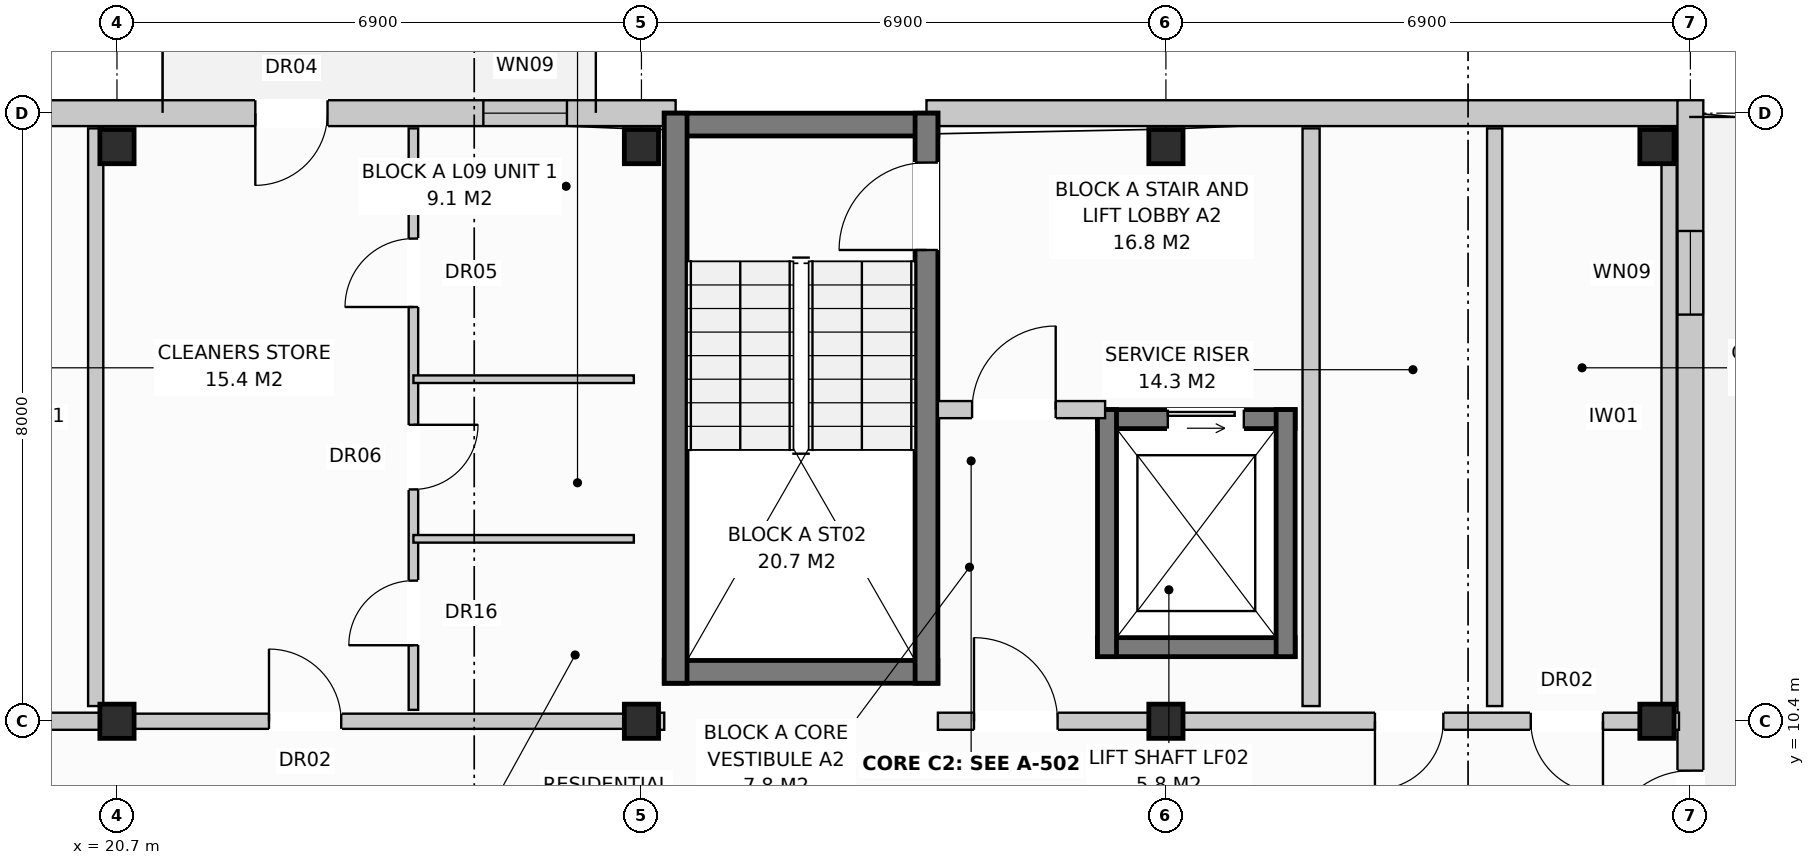
"""IFC4 building model, lengths in metres.
Left out: names, types, materials, properties, quantities, classifications, styles, units other than length and angle.
Written with IfcOpenShell. Run it as: python <this file> out.ifc"""

import sys

from ifc_helpers import new_model, si_unit, direction, frame, frame_2d, origin, origin_with_axes, origin_2d, place, context, subcontext, project, spatial, rectangle, extrude, element, fill, save


model = new_model("IFC4")
c1 = context("Model", 3, precision=1e-05, world=origin(), true_north=direction((0.0, 1.0)))
c2 = subcontext(c1, "Body", "Model", "MODEL_VIEW")
j1 = project(units=[si_unit("LENGTHUNIT", "METRE"), si_unit("PLANEANGLEUNIT", "RADIAN")], contexts=[c1])
p1 = place(None, origin())
s1 = spatial("IfcSite", under=j1, at=p1, CompositionType="ELEMENT")
p2 = place(p1, origin())
s2 = spatial("IfcBuilding", under=s1, at=p2, CompositionType="ELEMENT")
p3 = place(p2, frame((0.0, 0.0, 30.4)))
s3 = spatial("IfcBuildingStorey", under=s2, at=p3, CompositionType="ELEMENT", Elevation=30.4)
for number, where, z_axis, x_axis in (
    (1, (20.7, 10.4, 0.0), (0.0, 0.0, 1.0), (1.0, 0.0, 0.0)),
    (2, (20.7, 17.96, 0.0), (0.0, 0.0, 1.0), (1.0, 0.0, 0.0)),
    (3, (27.6, 10.4, 0.0), (0.0, 0.0, 1.0), (1.0, 0.0, 0.0)),
    (4, (27.6, 17.96, 0.0), (0.0, 0.0, 1.0), (1.0, 0.0, 0.0)),
    (5, (34.5, 10.4, 0.0), (0.0, 0.0, 1.0), (1.0, 0.0, 0.0)),
    (6, (34.5, 17.96, 0.0), (0.0, 0.0, 1.0), (1.0, 0.0, 0.0)),
    (7, (40.96, 10.4, 0.0), (0.0, 0.0, 1.0), (1.0, 0.0, 0.0)),
    (8, (40.96, 17.96, 0.0), (0.0, 0.0, 1.0), (1.0, 0.0, 0.0)),
):
    element("IfcColumn", number, at=place(p3, frame(where, z_axis=z_axis, x_axis=x_axis)), inside=s3, PredefinedType="COLUMN", context=c2, shape_type="SweptSolid", body=[
        extrude(rectangle(XDim=0.45, YDim=0.45, at=origin_2d()), origin(), (0.0, 0.0, 1.0), 3.2),
    ])
p4 = place(p3, frame((10.65, 18.4, 0.0), z_axis=(0.0, 0.0, 1.0), x_axis=(1.0, 0.0, 0.0)))
e9 = element("IfcWall", 9, at=p4, inside=s3, PredefinedType="STANDARD", context=c2, shape_type="SweptSolid", body=[
    extrude(rectangle(XDim=17.4, YDim=0.34, at=frame_2d((8.7, 0.0))), origin(), (0.0, 0.0, 1.0), 2.96),
])
p5 = place(p4, frame((11.87, 0.0, 0.0)))
e10 = element("IfcOpeningElement", 10, at=p5, cuts=e9, PredefinedType="OPENING", context=c2, shape_type="SweptSolid", body=[
    extrude(rectangle(XDim=0.95, YDim=2.1, at=frame_2d((0.475, 1.05))), frame((0.0, 0.182, 0.0), z_axis=(0.0, -1.0, 0.0), x_axis=(1.0, 0.0, 0.0)), (0.0, 0.0, 1.0), 0.364),
])
p6 = place(p4, frame((14.87, 0.0, 0.72)))
e11 = element("IfcOpeningElement", 11, at=p6, cuts=e9, PredefinedType="OPENING", context=c2, shape_type="SweptSolid", body=[
    extrude(rectangle(XDim=1.1, YDim=1.5, at=frame_2d((0.55, 0.75))), frame((0.0, 0.182, 0.0), z_axis=(0.0, -1.0, 0.0), x_axis=(1.0, 0.0, 0.0)), (0.0, 0.0, 1.0), 0.364),
])
p7 = place(p3, frame((31.35, 18.4, 0.0), z_axis=(0.0, 0.0, 1.0), x_axis=(1.0, 0.0, 0.0)))
e12 = element("IfcWall", 12, at=p7, inside=s3, PredefinedType="STANDARD", context=c2, shape_type="SweptSolid", body=[
    extrude(rectangle(XDim=9.89, YDim=0.34, at=frame_2d((4.945, 0.0))), origin(), (0.0, 0.0, 1.0), 2.96),
])
p8 = place(p3, frame((41.4, -0.17, 0.0), z_axis=(0.0, 0.0, 1.0), x_axis=(0.0, 1.0, 0.0)))
e13 = element("IfcWall", 13, at=p8, inside=s3, PredefinedType="STANDARD", context=c2, shape_type="SweptSolid", body=[
    extrude(rectangle(XDim=18.74, YDim=0.34, at=frame_2d((9.37, 0.0))), origin(), (0.0, 0.0, 1.0), 2.96),
])
p9 = place(p8, frame((8.82, 0.0, 0.0)))
e14 = element("IfcOpeningElement", 14, at=p9, cuts=e13, PredefinedType="OPENING", context=c2, shape_type="SweptSolid", body=[
    extrude(rectangle(XDim=1.1, YDim=2.1, at=frame_2d((0.55, 1.05))), frame((0.0, 0.182, 0.0), z_axis=(0.0, -1.0, 0.0), x_axis=(1.0, 0.0, 0.0)), (0.0, 0.0, 1.0), 0.364),
])
p10 = place(p8, frame((1.82, 0.0, 0.0)))
e15 = element("IfcOpeningElement", 15, at=p10, cuts=e13, PredefinedType="OPENING", context=c2, shape_type="SweptSolid", body=[
    extrude(rectangle(XDim=1.1, YDim=2.1, at=frame_2d((0.55, 1.05))), frame((0.0, 0.182, 0.0), z_axis=(0.0, -1.0, 0.0), x_axis=(1.0, 0.0, 0.0)), (0.0, 0.0, 1.0), 0.364),
])
p11 = place(p8, frame((15.92, 0.0, 0.72)))
e16 = element("IfcOpeningElement", 16, at=p11, cuts=e13, PredefinedType="OPENING", context=c2, shape_type="SweptSolid", body=[
    extrude(rectangle(XDim=1.1, YDim=1.5, at=frame_2d((0.55, 0.75))), frame((0.0, 0.182, 0.0), z_axis=(0.0, -1.0, 0.0), x_axis=(1.0, 0.0, 0.0)), (0.0, 0.0, 1.0), 0.364),
])
p12 = place(p3, frame((20.42, 10.6, 0.0), z_axis=(0.0, 0.0, 1.0), x_axis=(0.0, 1.0, 0.0)))
e17 = element("IfcWall", 17, at=p12, inside=s3, PredefinedType="PARTITIONING", context=c2, shape_type="SweptSolid", body=[
    extrude(rectangle(XDim=7.6, YDim=0.2, at=frame_2d((3.8, 0.0))), origin(), (0.0, 0.0, 1.0), 2.96),
])
p13 = place(p3, frame((10.8, 10.4, 0.0), z_axis=(0.0, 0.0, 1.0), x_axis=(1.0, 0.0, 0.0)))
e18 = element("IfcWall", 18, at=p13, inside=s3, PredefinedType="PARTITIONING", context=c2, shape_type="SweptSolid", body=[
    extrude(rectangle(XDim=9.9, YDim=0.225, at=frame_2d((4.95, 0.0))), origin(), (0.0, 0.0, 1.0), 2.4),
])
p14 = place(p13, frame((0.475, 0.0, 0.0)))
e19 = element("IfcOpeningElement", 19, at=p14, cuts=e18, PredefinedType="OPENING", context=c2, shape_type="SweptSolid", body=[
    extrude(rectangle(XDim=1.1, YDim=2.15, at=frame_2d((0.55, 1.075))), frame((0.0, 0.125, 0.0), z_axis=(0.0, -1.0, 0.0), x_axis=(1.0, 0.0, 0.0)), (0.0, 0.0, 1.0), 0.249),
])
p15 = place(p13, frame((5.75, 0.0, 0.0)))
e20 = element("IfcOpeningElement", 20, at=p15, cuts=e18, PredefinedType="OPENING", context=c2, shape_type="SweptSolid", body=[
    extrude(rectangle(XDim=0.9, YDim=2.1, at=frame_2d((0.45, 1.05))), frame((0.0, 0.125, 0.0), z_axis=(0.0, -1.0, 0.0), x_axis=(1.0, 0.0, 0.0)), (0.0, 0.0, 1.0), 0.249),
])
p16 = place(p13, frame((7.8, 0.0, 0.0)))
e21 = element("IfcOpeningElement", 21, at=p16, cuts=e18, PredefinedType="OPENING", context=c2, shape_type="SweptSolid", body=[
    extrude(rectangle(XDim=0.95, YDim=2.15, at=frame_2d((0.475, 1.075))), frame((0.0, 0.125, 0.0), z_axis=(0.0, -1.0, 0.0), x_axis=(1.0, 0.0, 0.0)), (0.0, 0.0, 1.0), 0.249),
])
for number, where, z_axis, x_axis in (
    (22, (27.9, 18.25, 0.0), (0.0, 0.0, 1.0), (1.0, 0.0, 0.0)),
    (23, (27.9, 11.05, 0.0), (0.0, 0.0, 1.0), (1.0, 0.0, 0.0)),
):
    element("IfcWall", number, at=place(p3, frame(where, z_axis=z_axis, x_axis=x_axis)), inside=s3, PredefinedType="SHEAR", context=c2, shape_type="SweptSolid", body=[
        extrude(rectangle(XDim=3.6, YDim=0.3, at=frame_2d((1.8, 0.0))), origin(), (0.0, 0.0, 1.0), 2.96),
    ])
p17 = place(p3, frame((28.05, 10.9, 0.0), z_axis=(0.0, 0.0, 1.0), x_axis=(0.0, 1.0, 0.0)))
e24 = element("IfcWall", 24, at=p17, inside=s3, PredefinedType="SHEAR", context=c2, shape_type="SweptSolid", body=[
    extrude(rectangle(XDim=7.5, YDim=0.3, at=frame_2d((3.75, 0.0))), origin(), (0.0, 0.0, 1.0), 2.96),
])
p18 = place(p3, frame((31.35, 10.9, 0.0), z_axis=(0.0, 0.0, 1.0), x_axis=(0.0, 1.0, 0.0)))
e25 = element("IfcWall", 25, at=p18, inside=s3, PredefinedType="SHEAR", context=c2, shape_type="SweptSolid", body=[
    extrude(rectangle(XDim=7.5, YDim=0.3, at=frame_2d((3.75, 0.0))), origin(), (0.0, 0.0, 1.0), 2.96),
])
p19 = place(p18, frame((5.7, 0.0, 0.0)))
e26 = element("IfcOpeningElement", 26, at=p19, cuts=e25, PredefinedType="OPENING", context=c2, shape_type="SweptSolid", body=[
    extrude(rectangle(XDim=1.15, YDim=2.15, at=frame_2d((0.575, 1.075))), frame((0.0, 0.162, 0.0), z_axis=(0.0, -1.0, 0.0), x_axis=(1.0, 0.0, 0.0)), (0.0, 0.0, 1.0), 0.324),
])
p20 = place(p3, frame((33.6, 14.375, 0.0), z_axis=(0.0, 0.0, 1.0), x_axis=(1.0, 0.0, 0.0)))
e27 = element("IfcWall", 27, at=p20, inside=s3, PredefinedType="SHEAR", context=c2, shape_type="SweptSolid", body=[
    extrude(rectangle(XDim=2.6, YDim=0.25, at=frame_2d((1.3, 0.0))), origin(), (0.0, 0.0, 1.0), 2.96),
])
p21 = place(p20, frame((0.925, 0.0, 0.0)))
e28 = element("IfcOpeningElement", 28, at=p21, cuts=e27, PredefinedType="OPENING", context=c2, shape_type="SweptSolid", body=[
    extrude(rectangle(XDim=1.0, YDim=2.1, at=frame_2d((0.5, 1.05))), frame((0.0, 0.137, 0.0), z_axis=(0.0, -1.0, 0.0), x_axis=(1.0, 0.0, 0.0)), (0.0, 0.0, 1.0), 0.274),
])
p22 = place(p3, frame((33.6, 11.375, 0.0), z_axis=(0.0, 0.0, 1.0), x_axis=(1.0, 0.0, 0.0)))
e29 = element("IfcWall", 29, at=p22, inside=s3, PredefinedType="SHEAR", context=c2, shape_type="SweptSolid", body=[
    extrude(rectangle(XDim=2.6, YDim=0.25, at=frame_2d((1.3, 0.0))), origin(), (0.0, 0.0, 1.0), 2.96),
])
for number, where, z_axis, x_axis in (
    (30, (33.725, 11.25, 0.0), (0.0, 0.0, 1.0), (0.0, 1.0, 0.0)),
    (31, (36.075, 11.25, 0.0), (0.0, 0.0, 1.0), (0.0, 1.0, 0.0)),
):
    element("IfcWall", number, at=place(p3, frame(where, z_axis=z_axis, x_axis=x_axis)), inside=s3, PredefinedType="SHEAR", context=c2, shape_type="SweptSolid", body=[
        extrude(rectangle(XDim=3.25, YDim=0.25, at=frame_2d((1.625, 0.0))), origin(), (0.0, 0.0, 1.0), 2.96),
    ])
p23 = place(p3, frame((36.41, 10.6, 0.0), z_axis=(0.0, 0.0, 1.0), x_axis=(0.0, 1.0, 0.0)))
e32 = element("IfcWall", 32, at=p23, inside=s3, PredefinedType="PARTITIONING", context=c2, shape_type="SweptSolid", body=[
    extrude(rectangle(XDim=7.6, YDim=0.225, at=frame_2d((3.8, 0.0))), origin(), (0.0, 0.0, 1.0), 2.59),
])
p24 = place(p3, frame((31.5, 14.5, 0.0), z_axis=(0.0, 0.0, 1.0), x_axis=(1.0, 0.0, 0.0)))
e33 = element("IfcWall", 33, at=p24, inside=s3, PredefinedType="PARTITIONING", context=c2, shape_type="SweptSolid", body=[
    extrude(rectangle(XDim=2.2, YDim=0.225, at=frame_2d((1.1, 0.0))), origin(), (0.0, 0.0, 1.0), 2.96),
])
p25 = place(p24, frame((0.45, 0.0, 0.0)))
e34 = element("IfcOpeningElement", 34, at=p25, cuts=e33, PredefinedType="OPENING", context=c2, shape_type="SweptSolid", body=[
    extrude(rectangle(XDim=1.1, YDim=2.15, at=frame_2d((0.55, 1.075))), frame((0.0, 0.125, 0.0), z_axis=(0.0, -1.0, 0.0), x_axis=(1.0, 0.0, 0.0)), (0.0, 0.0, 1.0), 0.249),
])
p26 = place(p3, frame((27.6, 10.4, 0.0), z_axis=(0.0, 0.0, 1.0), x_axis=(1.0, 0.0, 0.0)))
e35 = element("IfcWall", 35, at=p26, inside=s3, PredefinedType="PARTITIONING", context=c2, shape_type="SweptSolid", body=[
    extrude(rectangle(XDim=0.3, YDim=0.225, at=frame_2d((0.15, 0.0))), origin(), (0.0, 0.0, 1.0), 2.96),
])
p27 = place(p3, frame((38.825, 10.6, 0.0), z_axis=(0.0, 0.0, 1.0), x_axis=(0.0, 1.0, 0.0)))
e36 = element("IfcWall", 36, at=p27, inside=s3, PredefinedType="PARTITIONING", context=c2, shape_type="SweptSolid", body=[
    extrude(rectangle(XDim=7.6, YDim=0.2, at=frame_2d((3.8, 0.0))), origin(), (0.0, 0.0, 1.0), 2.96),
])
p28 = place(p3, frame((41.12, 10.6, 0.0), z_axis=(0.0, 0.0, 1.0), x_axis=(0.0, 1.0, 0.0)))
e37 = element("IfcWall", 37, at=p28, inside=s3, PredefinedType="PARTITIONING", context=c2, shape_type="SweptSolid", body=[
    extrude(rectangle(XDim=7.6, YDim=0.2, at=frame_2d((3.8, 0.0))), origin(), (0.0, 0.0, 1.0), 2.4),
])
p29 = place(p3, frame((31.5, 10.4, 0.0), z_axis=(0.0, 0.0, 1.0), x_axis=(1.0, 0.0, 0.0)))
e38 = element("IfcWall", 38, at=p29, inside=s3, PredefinedType="PARTITIONING", context=c2, shape_type="SweptSolid", body=[
    extrude(rectangle(XDim=9.75, YDim=0.225, at=frame_2d((4.875, 0.0))), origin(), (0.0, 0.0, 1.0), 2.4),
])
p30 = place(p29, frame((0.475, 0.0, 0.0)))
e39 = element("IfcOpeningElement", 39, at=p30, cuts=e38, PredefinedType="OPENING", context=c2, shape_type="SweptSolid", body=[
    extrude(rectangle(XDim=1.1, YDim=2.15, at=frame_2d((0.55, 1.075))), frame((0.0, 0.125, 0.0), z_axis=(0.0, -1.0, 0.0), x_axis=(1.0, 0.0, 0.0)), (0.0, 0.0, 1.0), 0.249),
])
p31 = place(p29, frame((5.75, 0.0, 0.0)))
e40 = element("IfcOpeningElement", 40, at=p31, cuts=e38, PredefinedType="OPENING", context=c2, shape_type="SweptSolid", body=[
    extrude(rectangle(XDim=0.9, YDim=2.1, at=frame_2d((0.45, 1.05))), frame((0.0, 0.125, 0.0), z_axis=(0.0, -1.0, 0.0), x_axis=(1.0, 0.0, 0.0)), (0.0, 0.0, 1.0), 0.249),
])
p32 = place(p29, frame((7.8, 0.0, 0.0)))
e41 = element("IfcOpeningElement", 41, at=p32, cuts=e38, PredefinedType="OPENING", context=c2, shape_type="SweptSolid", body=[
    extrude(rectangle(XDim=0.95, YDim=2.15, at=frame_2d((0.475, 1.075))), frame((0.0, 0.125, 0.0), z_axis=(0.0, -1.0, 0.0), x_axis=(1.0, 0.0, 0.0)), (0.0, 0.0, 1.0), 0.249),
])
p33 = place(p3, frame((20.7, 10.4, 0.0), z_axis=(0.0, 0.0, 1.0), x_axis=(1.0, 0.0, 0.0)))
e42 = element("IfcWall", 42, at=p33, inside=s3, PredefinedType="PARTITIONING", context=c2, shape_type="SweptSolid", body=[
    extrude(rectangle(XDim=6.9, YDim=0.2, at=frame_2d((3.45, 0.0))), origin(), (0.0, 0.0, 1.0), 2.4),
])
p34 = place(p33, frame((2.0, 0.0, 0.0)))
e43 = element("IfcOpeningElement", 43, at=p34, cuts=e42, PredefinedType="OPENING", context=c2, shape_type="SweptSolid", body=[
    extrude(rectangle(XDim=0.95, YDim=2.15, at=frame_2d((0.475, 1.075))), frame((0.0, 0.112, 0.0), z_axis=(0.0, -1.0, 0.0), x_axis=(1.0, 0.0, 0.0)), (0.0, 0.0, 1.0), 0.224),
])
p35 = place(p3, frame((24.6, 10.55, 0.0), z_axis=(0.0, 0.0, 1.0), x_axis=(0.0, 1.0, 0.0)))
e44 = element("IfcWall", 44, at=p35, inside=s3, PredefinedType="PARTITIONING", context=c2, shape_type="SweptSolid", body=[
    extrude(rectangle(XDim=7.65, YDim=0.125, at=frame_2d((3.825, 0.0))), origin(), (0.0, 0.0, 1.0), 2.96),
])
p36 = place(p35, frame((0.85, 0.0, 0.0)))
e45 = element("IfcOpeningElement", 45, at=p36, cuts=e44, PredefinedType="OPENING", context=c2, shape_type="SweptSolid", body=[
    extrude(rectangle(XDim=0.85, YDim=2.1, at=frame_2d((0.425, 1.05))), frame((0.0, 0.074, 0.0), z_axis=(0.0, -1.0, 0.0), x_axis=(1.0, 0.0, 0.0)), (0.0, 0.0, 1.0), 0.149),
])
p37 = place(p35, frame((2.9, 0.0, 0.0)))
e46 = element("IfcOpeningElement", 46, at=p37, cuts=e44, PredefinedType="OPENING", context=c2, shape_type="SweptSolid", body=[
    extrude(rectangle(XDim=0.85, YDim=2.05, at=frame_2d((0.425, 1.025))), frame((0.0, 0.074, 0.0), z_axis=(0.0, -1.0, 0.0), x_axis=(1.0, 0.0, 0.0)), (0.0, 0.0, 1.0), 0.149),
])
p38 = place(p35, frame((5.3, 0.0, 0.0)))
e47 = element("IfcOpeningElement", 47, at=p38, cuts=e44, PredefinedType="OPENING", context=c2, shape_type="SweptSolid", body=[
    extrude(rectangle(XDim=0.9, YDim=2.1, at=frame_2d((0.45, 1.05))), frame((0.0, 0.074, 0.0), z_axis=(0.0, -1.0, 0.0), x_axis=(1.0, 0.0, 0.0)), (0.0, 0.0, 1.0), 0.149),
])
for number, where, z_axis, x_axis in (
    (48, (24.6, 12.8, 0.0), (0.0, 0.0, 1.0), (1.0, 0.0, 0.0)),
    (49, (24.6, 14.9, 0.0), (0.0, 0.0, 1.0), (1.0, 0.0, 0.0)),
):
    element("IfcWall", number, at=place(p3, frame(where, z_axis=z_axis, x_axis=x_axis)), inside=s3, PredefinedType="PARTITIONING", context=c2, shape_type="SweptSolid", body=[
        extrude(rectangle(XDim=2.9, YDim=0.1, at=frame_2d((1.45, 0.0))), origin(), (0.0, 0.0, 1.0), 2.96),
    ])
p39 = place(p5, frame((0.95, 0.0, 0.0), z_axis=(0.0, 0.0, 1.0), x_axis=(-1.0, 0.0, 0.0)))
e50 = element("IfcDoor", 50, at=p39, inside=s3, OperationType="SINGLE_SWING_LEFT", PredefinedType="DOOR", context=c2, shape_type="SweptSolid", body=[
    extrude(rectangle(XDim=0.95, YDim=2.1, at=frame_2d((0.475, 1.05))), frame((0.0, 0.025, 0.0), z_axis=(0.0, -1.0, 0.0), x_axis=(1.0, 0.0, 0.0)), (0.0, 0.0, 1.0), 0.05),
])
fill(e10, e50)
p40 = place(p6, origin_with_axes())
e51 = element("IfcWindow", 51, at=p40, inside=s3, PartitioningType="SINGLE_PANEL", PredefinedType="WINDOW", context=c2, shape_type="SweptSolid", body=[
    extrude(rectangle(XDim=1.1, YDim=1.5, at=frame_2d((0.55, 0.75))), frame((0.0, 0.03, 0.0), z_axis=(0.0, -1.0, 0.0), x_axis=(1.0, 0.0, 0.0)), (0.0, 0.0, 1.0), 0.06),
])
fill(e11, e51)
p41 = place(p9, origin_with_axes())
e52 = element("IfcDoor", 52, at=p41, inside=s3, OperationType="SINGLE_SWING_LEFT", PredefinedType="DOOR", context=c2, shape_type="SweptSolid", body=[
    extrude(rectangle(XDim=1.1, YDim=2.1, at=frame_2d((0.55, 1.05))), frame((0.0, 0.025, 0.0), z_axis=(0.0, -1.0, 0.0), x_axis=(1.0, 0.0, 0.0)), (0.0, 0.0, 1.0), 0.05),
])
fill(e14, e52)
p42 = place(p11, origin_with_axes())
e53 = element("IfcWindow", 53, at=p42, inside=s3, PartitioningType="SINGLE_PANEL", PredefinedType="WINDOW", context=c2, shape_type="SweptSolid", body=[
    extrude(rectangle(XDim=1.1, YDim=1.5, at=frame_2d((0.55, 0.75))), frame((0.0, 0.03, 0.0), z_axis=(0.0, -1.0, 0.0), x_axis=(1.0, 0.0, 0.0)), (0.0, 0.0, 1.0), 0.06),
])
fill(e16, e53)
p43 = place(p19, origin_with_axes())
e54 = element("IfcDoor", 54, at=p43, inside=s3, OperationType="SINGLE_SWING_LEFT", PredefinedType="DOOR", context=c2, shape_type="SweptSolid", body=[
    extrude(rectangle(XDim=1.15, YDim=2.15, at=frame_2d((0.575, 1.075))), frame((0.0, 0.025, 0.0), z_axis=(0.0, -1.0, 0.0), x_axis=(1.0, 0.0, 0.0)), (0.0, 0.0, 1.0), 0.05),
])
fill(e26, e54)
p44 = place(p21, origin_with_axes())
e55 = element("IfcDoor", 55, at=p44, inside=s3, OperationType="SLIDING_TO_LEFT", PredefinedType="DOOR", context=c2, shape_type="SweptSolid", body=[
    extrude(rectangle(XDim=1.0, YDim=2.1, at=frame_2d((0.5, 1.05))), frame((0.0, 0.025, 0.0), z_axis=(0.0, -1.0, 0.0), x_axis=(1.0, 0.0, 0.0)), (0.0, 0.0, 1.0), 0.05),
])
fill(e28, e55)
p45 = place(p25, origin_with_axes())
e56 = element("IfcDoor", 56, at=p45, inside=s3, OperationType="SINGLE_SWING_RIGHT", PredefinedType="DOOR", context=c2, shape_type="SweptSolid", body=[
    extrude(rectangle(XDim=1.1, YDim=2.15, at=frame_2d((0.55, 1.075))), frame((0.0, 0.025, 0.0), z_axis=(0.0, -1.0, 0.0), x_axis=(1.0, 0.0, 0.0)), (0.0, 0.0, 1.0), 0.05),
])
fill(e34, e56)
p46 = place(p30, origin_with_axes())
e57 = element("IfcDoor", 57, at=p46, inside=s3, OperationType="SINGLE_SWING_LEFT", PredefinedType="DOOR", context=c2, shape_type="SweptSolid", body=[
    extrude(rectangle(XDim=1.1, YDim=2.15, at=frame_2d((0.55, 1.075))), frame((0.0, 0.025, 0.0), z_axis=(0.0, -1.0, 0.0), x_axis=(1.0, 0.0, 0.0)), (0.0, 0.0, 1.0), 0.05),
])
fill(e39, e57)
p47 = place(p31, frame((0.9, 0.0, 0.0), z_axis=(0.0, 0.0, 1.0), x_axis=(-1.0, 0.0, 0.0)))
e58 = element("IfcDoor", 58, at=p47, inside=s3, OperationType="SINGLE_SWING_LEFT", PredefinedType="DOOR", context=c2, shape_type="SweptSolid", body=[
    extrude(rectangle(XDim=0.9, YDim=2.1, at=frame_2d((0.45, 1.05))), frame((0.0, 0.025, 0.0), z_axis=(0.0, -1.0, 0.0), x_axis=(1.0, 0.0, 0.0)), (0.0, 0.0, 1.0), 0.05),
])
fill(e40, e58)
p48 = place(p32, frame((0.95, 0.0, 0.0), z_axis=(0.0, 0.0, 1.0), x_axis=(-1.0, 0.0, 0.0)))
e59 = element("IfcDoor", 59, at=p48, inside=s3, OperationType="SINGLE_SWING_RIGHT", PredefinedType="DOOR", context=c2, shape_type="SweptSolid", body=[
    extrude(rectangle(XDim=0.95, YDim=2.15, at=frame_2d((0.475, 1.075))), frame((0.0, 0.025, 0.0), z_axis=(0.0, -1.0, 0.0), x_axis=(1.0, 0.0, 0.0)), (0.0, 0.0, 1.0), 0.05),
])
fill(e41, e59)
p49 = place(p34, origin_with_axes())
e60 = element("IfcDoor", 60, at=p49, inside=s3, OperationType="SINGLE_SWING_LEFT", PredefinedType="DOOR", context=c2, shape_type="SweptSolid", body=[
    extrude(rectangle(XDim=0.95, YDim=2.15, at=frame_2d((0.475, 1.075))), frame((0.0, 0.025, 0.0), z_axis=(0.0, -1.0, 0.0), x_axis=(1.0, 0.0, 0.0)), (0.0, 0.0, 1.0), 0.05),
])
fill(e43, e60)
p50 = place(p36, origin_with_axes())
e61 = element("IfcDoor", 61, at=p50, inside=s3, OperationType="SINGLE_SWING_LEFT", PredefinedType="DOOR", context=c2, shape_type="SweptSolid", body=[
    extrude(rectangle(XDim=0.85, YDim=2.1, at=frame_2d((0.425, 1.05))), frame((0.0, 0.025, 0.0), z_axis=(0.0, -1.0, 0.0), x_axis=(1.0, 0.0, 0.0)), (0.0, 0.0, 1.0), 0.05),
])
fill(e45, e61)
p51 = place(p37, frame((0.85, 0.0, 0.0), z_axis=(0.0, 0.0, 1.0), x_axis=(-1.0, 0.0, 0.0)))
e62 = element("IfcDoor", 62, at=p51, inside=s3, OperationType="SINGLE_SWING_RIGHT", PredefinedType="DOOR", context=c2, shape_type="SweptSolid", body=[
    extrude(rectangle(XDim=0.85, YDim=2.05, at=frame_2d((0.425, 1.025))), frame((0.0, 0.025, 0.0), z_axis=(0.0, -1.0, 0.0), x_axis=(1.0, 0.0, 0.0)), (0.0, 0.0, 1.0), 0.05),
])
fill(e46, e62)
p52 = place(p38, origin_with_axes())
e63 = element("IfcDoor", 63, at=p52, inside=s3, OperationType="SINGLE_SWING_LEFT", PredefinedType="DOOR", context=c2, shape_type="SweptSolid", body=[
    extrude(rectangle(XDim=0.9, YDim=2.1, at=frame_2d((0.45, 1.05))), frame((0.0, 0.025, 0.0), z_axis=(0.0, -1.0, 0.0), x_axis=(1.0, 0.0, 0.0)), (0.0, 0.0, 1.0), 0.05),
])
fill(e47, e63)
save(model, sys.argv[1])
